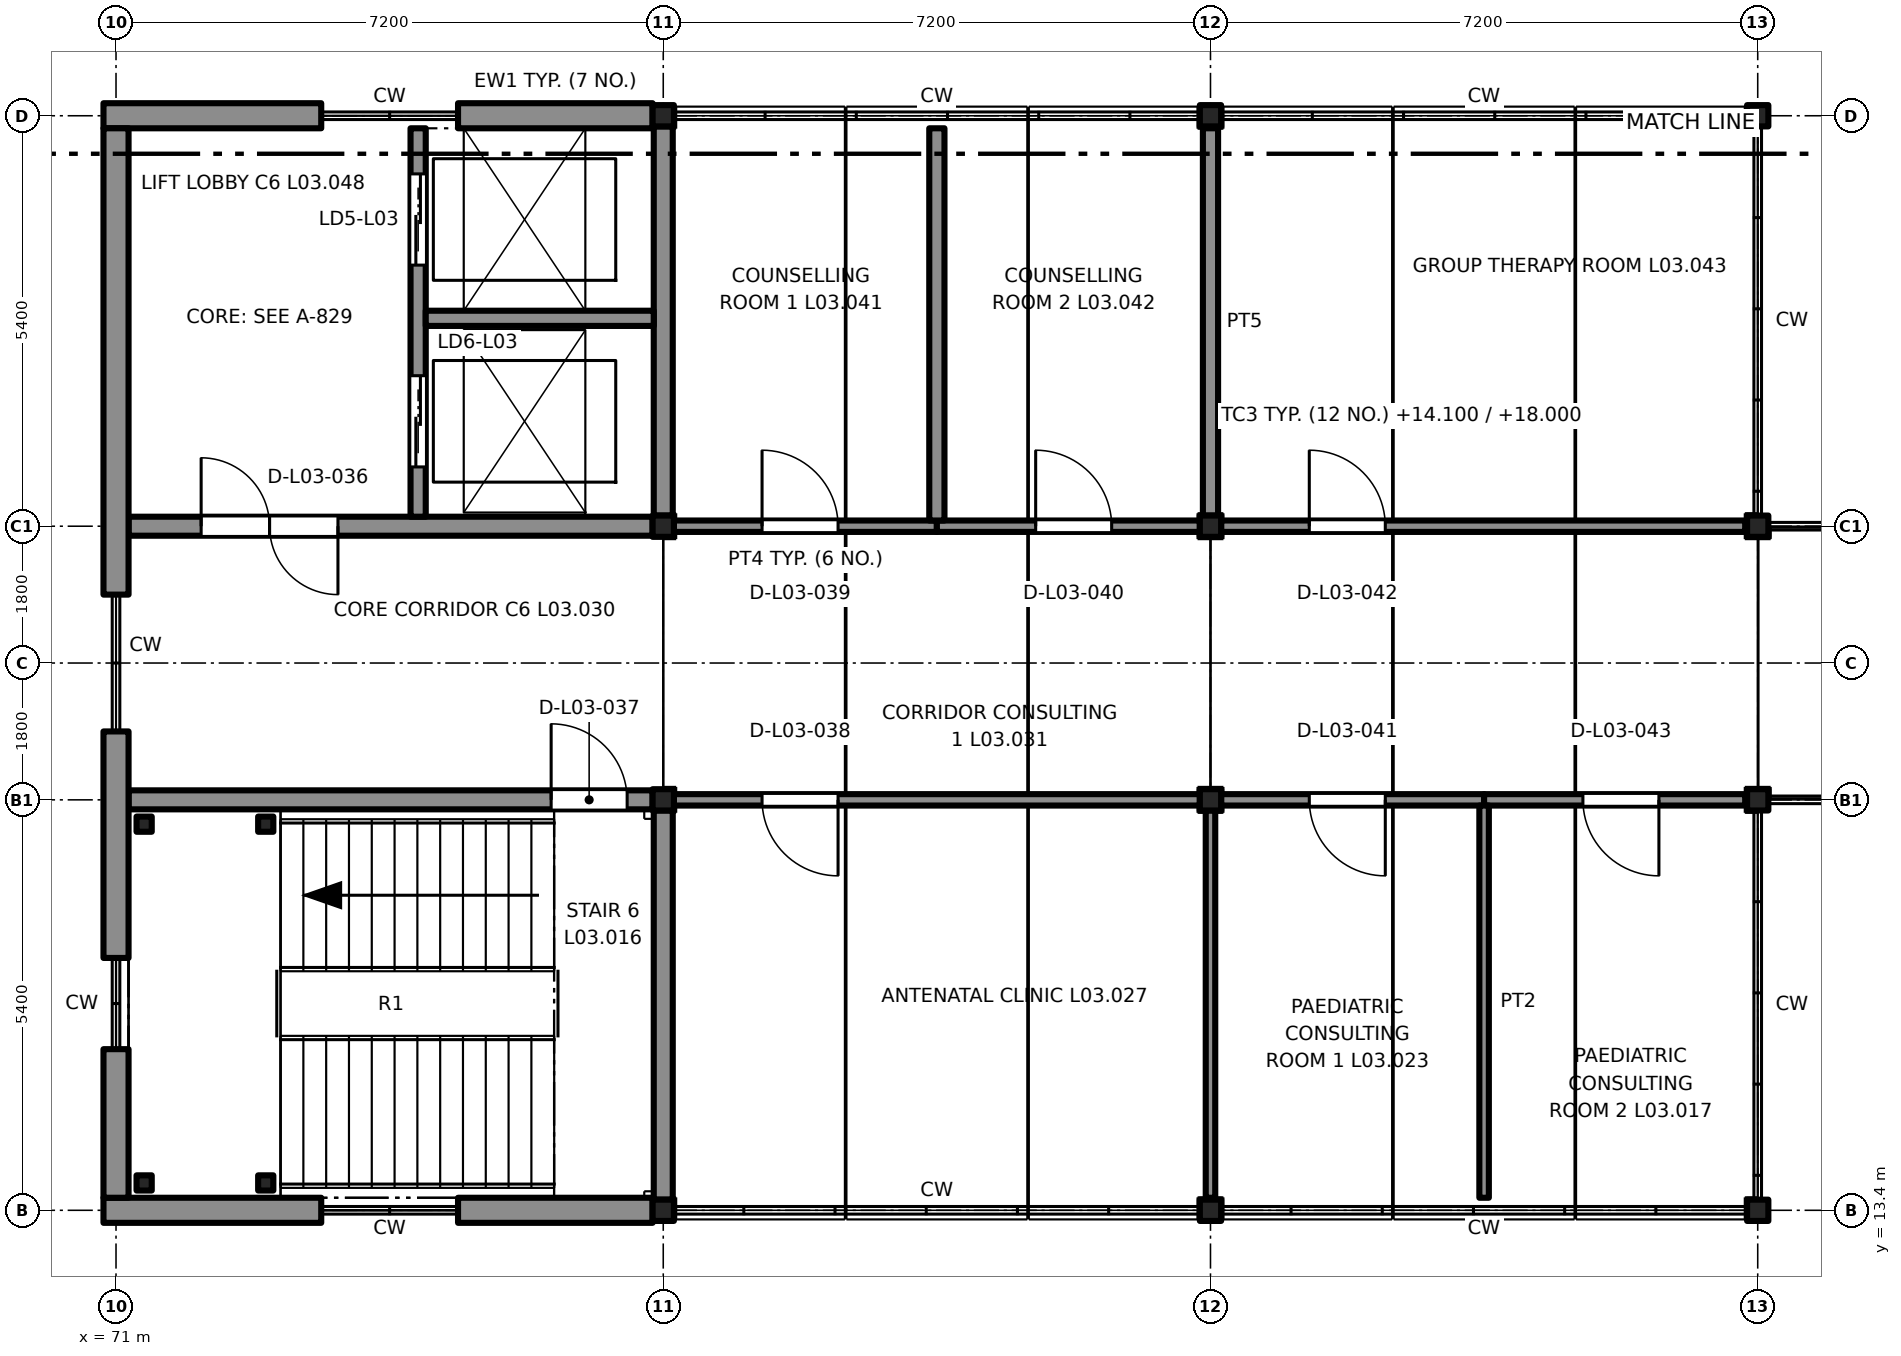
"""IFC4 building model, lengths in metres.
Left out: names, types, materials, properties, quantities, classifications, styles, units other than length and angle.
Written with IfcOpenShell. Run it as: python <this file> out.ifc"""

import sys

from ifc_helpers import new_model, si_unit, direction, frame, frame_2d, origin, origin_2d, place, context, subcontext, project, spatial, rectangle, extrude, element, fill, save


model = new_model("IFC4")
c1 = context("Model", 3, precision=1e-05, world=origin(), true_north=direction((0.0, 1.0)))
c2 = subcontext(c1, "Body", "Model", "MODEL_VIEW")
j1 = project(units=[si_unit("LENGTHUNIT", "METRE"), si_unit("PLANEANGLEUNIT", "RADIAN")], contexts=[c1])
p1 = place(None, origin())
s1 = spatial("IfcSite", under=j1, at=p1, CompositionType="ELEMENT")
p2 = place(p1, origin())
s2 = spatial("IfcBuilding", under=s1, at=p2, CompositionType="ELEMENT")
p3 = place(p2, frame((0.0, 0.0, 14.1)))
s3 = spatial("IfcBuildingStorey", under=s2, at=p3, CompositionType="ELEMENT", Elevation=14.1)
for number, where, z_axis, x_axis in (
    (1, (78.2, 13.4, 0.0), (0.0, 0.0, 1.0), (1.0, 0.0, 0.0)),
    (2, (78.2, 18.8, 0.0), (0.0, 0.0, 1.0), (1.0, 0.0, 0.0)),
    (3, (78.2, 22.4, 0.0), (0.0, 0.0, 1.0), (1.0, 0.0, 0.0)),
    (4, (78.2, 27.8, 0.0), (0.0, 0.0, 1.0), (1.0, 0.0, 0.0)),
    (5, (85.4, 13.4, 0.0), (0.0, 0.0, 1.0), (1.0, 0.0, 0.0)),
    (6, (85.4, 18.8, 0.0), (0.0, 0.0, 1.0), (1.0, 0.0, 0.0)),
    (7, (85.4, 22.4, 0.0), (0.0, 0.0, 1.0), (1.0, 0.0, 0.0)),
    (8, (85.4, 27.8, 0.0), (0.0, 0.0, 1.0), (1.0, 0.0, 0.0)),
    (9, (92.6, 13.4, 0.0), (0.0, 0.0, 1.0), (1.0, 0.0, 0.0)),
    (10, (92.6, 18.8, 0.0), (0.0, 0.0, 1.0), (1.0, 0.0, 0.0)),
    (11, (92.6, 22.4, 0.0), (0.0, 0.0, 1.0), (1.0, 0.0, 0.0)),
    (12, (92.6, 27.8, 0.0), (0.0, 0.0, 1.0), (1.0, 0.0, 0.0)),
):
    element("IfcColumn", number, at=place(p3, frame(where, z_axis=z_axis, x_axis=x_axis)), inside=s3, PredefinedType="COLUMN", context=c2, shape_type="SweptSolid", body=[
        extrude(rectangle(XDim=0.28, YDim=0.28, at=origin_2d()), origin(), (0.0, 0.0, 1.0), 3.9),
    ])
p4 = place(p3, frame((71.165, 18.8, 0.0), z_axis=(0.0, 0.0, 1.0), x_axis=(1.0, 0.0, 0.0)))
e13 = element("IfcWall", 13, at=p4, inside=s3, PredefinedType="SHEAR", context=c2, shape_type="SweptSolid", body=[
    extrude(rectangle(XDim=6.895, YDim=0.25, at=frame_2d((3.448, 0.0))), origin(), (0.0, 0.0, 1.0), 3.2),
])
p5 = place(p4, frame((5.56, 0.0, 0.0)))
e14 = element("IfcOpeningElement", 14, at=p5, cuts=e13, PredefinedType="OPENING", context=c2, shape_type="SweptSolid", body=[
    extrude(rectangle(XDim=1.0, YDim=2.1, at=frame_2d((0.5, 1.05))), frame((0.0, 0.135, 0.0), z_axis=(0.0, -1.0, 0.0), x_axis=(1.0, 0.0, 0.0)), (0.0, 0.0, 1.0), 0.27),
])
p6 = place(p3, frame((78.2, 13.54, 0.0), z_axis=(0.0, 0.0, 1.0), x_axis=(0.0, 1.0, 0.0)))
e15 = element("IfcWall", 15, at=p6, inside=s3, PredefinedType="SHEAR", context=c2, shape_type="SweptSolid", body=[
    extrude(rectangle(XDim=5.12, YDim=0.25, at=frame_2d((2.56, 0.0))), origin(), (0.0, 0.0, 1.0), 3.2),
])
p7 = place(p3, frame((71.165, 22.4, 0.0), z_axis=(0.0, 0.0, 1.0), x_axis=(1.0, 0.0, 0.0)))
e16 = element("IfcWall", 16, at=p7, inside=s3, PredefinedType="SHEAR", context=c2, shape_type="SweptSolid", body=[
    extrude(rectangle(XDim=6.895, YDim=0.25, at=frame_2d((3.448, 0.0))), origin(), (0.0, 0.0, 1.0), 3.2),
])
p8 = place(p7, frame((0.955, 0.0, 0.0)))
e17 = element("IfcOpeningElement", 17, at=p8, cuts=e16, PredefinedType="OPENING", context=c2, shape_type="SweptSolid", body=[
    extrude(rectangle(XDim=1.8, YDim=2.1, at=frame_2d((0.9, 1.05))), frame((0.0, 0.135, 0.0), z_axis=(0.0, -1.0, 0.0), x_axis=(1.0, 0.0, 0.0)), (0.0, 0.0, 1.0), 0.27),
])
p9 = place(p3, frame((78.2, 22.54, 0.0), z_axis=(0.0, 0.0, 1.0), x_axis=(0.0, 1.0, 0.0)))
e18 = element("IfcWall", 18, at=p9, inside=s3, PredefinedType="SHEAR", context=c2, shape_type="SweptSolid", body=[
    extrude(rectangle(XDim=5.12, YDim=0.25, at=frame_2d((2.56, 0.0))), origin(), (0.0, 0.0, 1.0), 3.2),
])
p10 = place(p3, frame((74.975, 22.525, 0.0), z_axis=(0.0, 0.0, 1.0), x_axis=(0.0, 1.0, 0.0)))
e19 = element("IfcWall", 19, at=p10, inside=s3, PredefinedType="SHEAR", context=c2, shape_type="SweptSolid", body=[
    extrude(rectangle(XDim=5.11, YDim=0.2, at=frame_2d((2.555, 0.0))), origin(), (0.0, 0.0, 1.0), 3.2),
])
p11 = place(p10, frame((3.31, 0.0, 0.0)))
e20 = element("IfcOpeningElement", 20, at=p11, cuts=e19, PredefinedType="OPENING", context=c2, shape_type="SweptSolid", body=[
    extrude(rectangle(XDim=1.2, YDim=2.1, at=frame_2d((0.6, 1.05))), frame((0.0, 0.11, 0.0), z_axis=(0.0, -1.0, 0.0), x_axis=(1.0, 0.0, 0.0)), (0.0, 0.0, 1.0), 0.22),
])
p12 = place(p10, frame((0.655, 0.0, 0.0)))
e21 = element("IfcOpeningElement", 21, at=p12, cuts=e19, PredefinedType="OPENING", context=c2, shape_type="SweptSolid", body=[
    extrude(rectangle(XDim=1.2, YDim=2.1, at=frame_2d((0.6, 1.05))), frame((0.0, 0.11, 0.0), z_axis=(0.0, -1.0, 0.0), x_axis=(1.0, 0.0, 0.0)), (0.0, 0.0, 1.0), 0.22),
])
p13 = place(p3, frame((78.075, 25.135, 0.0), z_axis=(0.0, 0.0, 1.0), x_axis=(-1.0, 0.0, 0.0)))
e22 = element("IfcWall", 22, at=p13, inside=s3, PredefinedType="SHEAR", context=c2, shape_type="SweptSolid", body=[
    extrude(rectangle(XDim=3.0, YDim=0.2, at=frame_2d((1.5, 0.0))), origin(), (0.0, 0.0, 1.0), 3.2),
])
for number, where, z_axis, x_axis in (
    (23, (71.37, 13.76, 0.0), (0.0, 0.0, 1.0), (1.0, 0.0, 0.0)),
    (24, (71.37, 18.48, 0.0), (0.0, 0.0, 1.0), (1.0, 0.0, 0.0)),
    (25, (72.97, 13.76, 0.0), (0.0, 0.0, 1.0), (1.0, 0.0, 0.0)),
    (26, (72.97, 18.48, 0.0), (0.0, 0.0, 1.0), (1.0, 0.0, 0.0)),
):
    element("IfcColumn", number, at=place(p3, frame(where, z_axis=z_axis, x_axis=x_axis)), inside=s3, PredefinedType="COLUMN", context=c2, shape_type="SweptSolid", body=[
        extrude(rectangle(XDim=0.2, YDim=0.2, at=origin_2d()), origin(), (0.0, 0.0, 1.0), 1.75),
    ])
p14 = place(p3, frame((73.7, 13.4, 0.0), z_axis=(0.0, 0.0, 1.0), x_axis=(-1.0, 0.0, 0.0)))
e27 = element("IfcWall", 27, at=p14, inside=s3, PredefinedType="SOLIDWALL", context=c2, shape_type="SweptSolid", body=[
    extrude(rectangle(XDim=2.865, YDim=0.33, at=frame_2d((1.433, 0.0))), origin(), (0.0, 0.0, 1.0), 3.2),
])
p15 = place(p3, frame((78.06, 13.4, 0.0), z_axis=(0.0, 0.0, 1.0), x_axis=(-1.0, 0.0, 0.0)))
e28 = element("IfcWall", 28, at=p15, inside=s3, PredefinedType="SOLIDWALL", context=c2, shape_type="SweptSolid", body=[
    extrude(rectangle(XDim=2.56, YDim=0.33, at=frame_2d((1.28, 0.0))), origin(), (0.0, 0.0, 1.0), 3.2),
])
p16 = place(p3, frame((70.835, 27.8, 0.0), z_axis=(0.0, 0.0, 1.0), x_axis=(1.0, 0.0, 0.0)))
e29 = element("IfcWall", 29, at=p16, inside=s3, PredefinedType="SOLIDWALL", context=c2, shape_type="SweptSolid", body=[
    extrude(rectangle(XDim=2.865, YDim=0.33, at=frame_2d((1.433, 0.0))), origin(), (0.0, 0.0, 1.0), 3.2),
])
p17 = place(p3, frame((75.5, 27.8, 0.0), z_axis=(0.0, 0.0, 1.0), x_axis=(1.0, 0.0, 0.0)))
e30 = element("IfcWall", 30, at=p17, inside=s3, PredefinedType="SOLIDWALL", context=c2, shape_type="SweptSolid", body=[
    extrude(rectangle(XDim=2.56, YDim=0.33, at=frame_2d((1.28, 0.0))), origin(), (0.0, 0.0, 1.0), 3.2),
])
p18 = place(p3, frame((71.0, 13.565, 0.0), z_axis=(0.0, 0.0, 1.0), x_axis=(0.0, 1.0, 0.0)))
e31 = element("IfcWall", 31, at=p18, inside=s3, PredefinedType="SOLIDWALL", context=c2, shape_type="SweptSolid", body=[
    extrude(rectangle(XDim=1.955, YDim=0.33, at=frame_2d((0.978, 0.0))), origin(), (0.0, 0.0, 1.0), 3.2),
])
p19 = place(p3, frame((71.0, 16.72, 0.0), z_axis=(0.0, 0.0, 1.0), x_axis=(0.0, 1.0, 0.0)))
e32 = element("IfcWall", 32, at=p19, inside=s3, PredefinedType="SOLIDWALL", context=c2, shape_type="SweptSolid", body=[
    extrude(rectangle(XDim=2.98, YDim=0.33, at=frame_2d((1.49, 0.0))), origin(), (0.0, 0.0, 1.0), 3.2),
])
p20 = place(p3, frame((71.0, 21.5, 0.0), z_axis=(0.0, 0.0, 1.0), x_axis=(0.0, 1.0, 0.0)))
e33 = element("IfcWall", 33, at=p20, inside=s3, PredefinedType="SOLIDWALL", context=c2, shape_type="SweptSolid", body=[
    extrude(rectangle(XDim=6.135, YDim=0.33, at=frame_2d((3.067, 0.0))), origin(), (0.0, 0.0, 1.0), 3.2),
])
p21 = place(p3, frame((85.26, 18.8, 0.0), z_axis=(0.0, 0.0, 1.0), x_axis=(-1.0, 0.0, 0.0)))
e34 = element("IfcWall", 34, at=p21, inside=s3, PredefinedType="PARTITIONING", context=c2, shape_type="SweptSolid", body=[
    extrude(rectangle(XDim=6.92, YDim=0.15, at=frame_2d((3.46, 0.0))), origin(), (0.0, 0.0, 1.0), 5.331),
])
p22 = place(p21, frame((4.76, 0.0, 0.0)))
e35 = element("IfcOpeningElement", 35, at=p22, cuts=e34, PredefinedType="OPENING", context=c2, shape_type="SweptSolid", body=[
    extrude(rectangle(XDim=1.0, YDim=2.1, at=frame_2d((0.5, 1.05))), frame((0.0, 0.085, 0.0), z_axis=(0.0, -1.0, 0.0), x_axis=(1.0, 0.0, 0.0)), (0.0, 0.0, 1.0), 0.17),
])
p23 = place(p3, frame((89.0, 18.8, 0.0), z_axis=(0.0, 0.0, 1.0), x_axis=(-1.0, 0.0, 0.0)))
e36 = element("IfcWall", 36, at=p23, inside=s3, PredefinedType="PARTITIONING", context=c2, shape_type="SweptSolid", body=[
    extrude(rectangle(XDim=3.46, YDim=0.15, at=frame_2d((1.73, 0.0))), origin(), (0.0, 0.0, 1.0), 5.331),
])
p24 = place(p23, frame((1.3, 0.0, 0.0)))
e37 = element("IfcOpeningElement", 37, at=p24, cuts=e36, PredefinedType="OPENING", context=c2, shape_type="SweptSolid", body=[
    extrude(rectangle(XDim=1.0, YDim=2.1, at=frame_2d((0.5, 1.05))), frame((0.0, 0.085, 0.0), z_axis=(0.0, -1.0, 0.0), x_axis=(1.0, 0.0, 0.0)), (0.0, 0.0, 1.0), 0.17),
])
p25 = place(p3, frame((85.4, 13.565, 0.0), z_axis=(0.0, 0.0, 1.0), x_axis=(0.0, 1.0, 0.0)))
e38 = element("IfcWall", 38, at=p25, inside=s3, PredefinedType="PARTITIONING", context=c2, shape_type="SweptSolid", body=[
    extrude(rectangle(XDim=5.095, YDim=0.125, at=frame_2d((2.547, 0.0))), origin(), (0.0, 0.0, 1.0), 3.9),
])
p26 = place(p3, frame((92.435, 18.8, 0.0), z_axis=(0.0, 0.0, 1.0), x_axis=(-1.0, 0.0, 0.0)))
e39 = element("IfcWall", 39, at=p26, inside=s3, PredefinedType="PARTITIONING", context=c2, shape_type="SweptSolid", body=[
    extrude(rectangle(XDim=3.435, YDim=0.15, at=frame_2d((1.718, 0.0))), origin(), (0.0, 0.0, 1.0), 5.331),
])
p27 = place(p26, frame((1.135, 0.0, 0.0)))
e40 = element("IfcOpeningElement", 40, at=p27, cuts=e39, PredefinedType="OPENING", context=c2, shape_type="SweptSolid", body=[
    extrude(rectangle(XDim=1.0, YDim=2.1, at=frame_2d((0.5, 1.05))), frame((0.0, 0.085, 0.0), z_axis=(0.0, -1.0, 0.0), x_axis=(1.0, 0.0, 0.0)), (0.0, 0.0, 1.0), 0.17),
])
p28 = place(p3, frame((89.0, 13.565, 0.0), z_axis=(0.0, 0.0, 1.0), x_axis=(0.0, 1.0, 0.0)))
e41 = element("IfcWall", 41, at=p28, inside=s3, PredefinedType="PARTITIONING", context=c2, shape_type="SweptSolid", body=[
    extrude(rectangle(XDim=5.16, YDim=0.125, at=frame_2d((2.58, 0.0))), origin(), (0.0, 0.0, 1.0), 5.331),
])
p29 = place(p3, frame((78.34, 22.4, 0.0), z_axis=(0.0, 0.0, 1.0), x_axis=(1.0, 0.0, 0.0)))
e42 = element("IfcWall", 42, at=p29, inside=s3, PredefinedType="PARTITIONING", context=c2, shape_type="SweptSolid", body=[
    extrude(rectangle(XDim=3.46, YDim=0.15, at=frame_2d((1.73, 0.0))), origin(), (0.0, 0.0, 1.0), 5.331),
])
p30 = place(p29, frame((1.16, 0.0, 0.0)))
e43 = element("IfcOpeningElement", 43, at=p30, cuts=e42, PredefinedType="OPENING", context=c2, shape_type="SweptSolid", body=[
    extrude(rectangle(XDim=1.0, YDim=2.1, at=frame_2d((0.5, 1.05))), frame((0.0, 0.085, 0.0), z_axis=(0.0, -1.0, 0.0), x_axis=(1.0, 0.0, 0.0)), (0.0, 0.0, 1.0), 0.17),
])
p31 = place(p3, frame((81.8, 22.4, 0.0), z_axis=(0.0, 0.0, 1.0), x_axis=(1.0, 0.0, 0.0)))
e44 = element("IfcWall", 44, at=p31, inside=s3, PredefinedType="PARTITIONING", context=c2, shape_type="SweptSolid", body=[
    extrude(rectangle(XDim=3.46, YDim=0.15, at=frame_2d((1.73, 0.0))), origin(), (0.0, 0.0, 1.0), 5.331),
])
p32 = place(p31, frame((1.3, 0.0, 0.0)))
e45 = element("IfcOpeningElement", 45, at=p32, cuts=e44, PredefinedType="OPENING", context=c2, shape_type="SweptSolid", body=[
    extrude(rectangle(XDim=1.0, YDim=2.1, at=frame_2d((0.5, 1.05))), frame((0.0, 0.085, 0.0), z_axis=(0.0, -1.0, 0.0), x_axis=(1.0, 0.0, 0.0)), (0.0, 0.0, 1.0), 0.17),
])
p33 = place(p3, frame((81.8, 27.635, 0.0), z_axis=(0.0, 0.0, 1.0), x_axis=(0.0, -1.0, 0.0)))
e46 = element("IfcWall", 46, at=p33, inside=s3, PredefinedType="PARTITIONING", context=c2, shape_type="SweptSolid", body=[
    extrude(rectangle(XDim=5.16, YDim=0.2, at=frame_2d((2.58, 0.0))), origin(), (0.0, 0.0, 1.0), 5.331),
])
p34 = place(p3, frame((85.54, 22.4, 0.0), z_axis=(0.0, 0.0, 1.0), x_axis=(1.0, 0.0, 0.0)))
e47 = element("IfcWall", 47, at=p34, inside=s3, PredefinedType="PARTITIONING", context=c2, shape_type="SweptSolid", body=[
    extrude(rectangle(XDim=6.895, YDim=0.15, at=frame_2d((3.448, 0.0))), origin(), (0.0, 0.0, 1.0), 5.331),
])
p35 = place(p34, frame((1.16, 0.0, 0.0)))
e48 = element("IfcOpeningElement", 48, at=p35, cuts=e47, PredefinedType="OPENING", context=c2, shape_type="SweptSolid", body=[
    extrude(rectangle(XDim=1.0, YDim=2.1, at=frame_2d((0.5, 1.05))), frame((0.0, 0.085, 0.0), z_axis=(0.0, -1.0, 0.0), x_axis=(1.0, 0.0, 0.0)), (0.0, 0.0, 1.0), 0.17),
])
p36 = place(p3, frame((85.4, 27.635, 0.0), z_axis=(0.0, 0.0, 1.0), x_axis=(0.0, -1.0, 0.0)))
e49 = element("IfcWall", 49, at=p36, inside=s3, PredefinedType="PARTITIONING", context=c2, shape_type="SweptSolid", body=[
    extrude(rectangle(XDim=5.095, YDim=0.2, at=frame_2d((2.547, 0.0))), origin(), (0.0, 0.0, 1.0), 3.9),
])
p37 = place(p5, origin())
e50 = element("IfcDoor", 50, at=p37, inside=s3, OperationType="SINGLE_SWING_RIGHT", PredefinedType="DOOR", context=c2, shape_type="SweptSolid", body=[
    extrude(rectangle(XDim=1.0, YDim=2.1, at=frame_2d((0.5, 1.05))), frame((0.0, 0.025, 0.0), z_axis=(0.0, -1.0, 0.0), x_axis=(1.0, 0.0, 0.0)), (0.0, 0.0, 1.0), 0.05),
])
fill(e14, e50)
p38 = place(p8, origin())
e51 = element("IfcDoor", 51, at=p38, inside=s3, OperationType="DOUBLE_DOOR_SINGLE_SWING", PredefinedType="DOOR", context=c2, shape_type="SweptSolid", body=[
    extrude(rectangle(XDim=1.8, YDim=2.1, at=frame_2d((0.9, 1.05))), frame((0.0, 0.025, 0.0), z_axis=(0.0, -1.0, 0.0), x_axis=(1.0, 0.0, 0.0)), (0.0, 0.0, 1.0), 0.05),
])
fill(e17, e51)
p39 = place(p11, origin())
e52 = element("IfcDoor", 52, at=p39, inside=s3, OperationType="DOUBLE_DOOR_SLIDING", PredefinedType="DOOR", context=c2, shape_type="SweptSolid", body=[
    extrude(rectangle(XDim=1.2, YDim=2.1, at=frame_2d((0.6, 1.05))), frame((0.0, 0.025, 0.0), z_axis=(0.0, -1.0, 0.0), x_axis=(1.0, 0.0, 0.0)), (0.0, 0.0, 1.0), 0.05),
])
fill(e20, e52)
p40 = place(p12, origin())
e53 = element("IfcDoor", 53, at=p40, inside=s3, OperationType="DOUBLE_DOOR_SLIDING", PredefinedType="DOOR", context=c2, shape_type="SweptSolid", body=[
    extrude(rectangle(XDim=1.2, YDim=2.1, at=frame_2d((0.6, 1.05))), frame((0.0, 0.025, 0.0), z_axis=(0.0, -1.0, 0.0), x_axis=(1.0, 0.0, 0.0)), (0.0, 0.0, 1.0), 0.05),
])
fill(e21, e53)
p41 = place(p22, origin())
e54 = element("IfcDoor", 54, at=p41, inside=s3, OperationType="SINGLE_SWING_RIGHT", PredefinedType="DOOR", context=c2, shape_type="SweptSolid", body=[
    extrude(rectangle(XDim=1.0, YDim=2.1, at=frame_2d((0.5, 1.05))), frame((0.0, 0.025, 0.0), z_axis=(0.0, -1.0, 0.0), x_axis=(1.0, 0.0, 0.0)), (0.0, 0.0, 1.0), 0.05),
])
fill(e35, e54)
p42 = place(p24, origin())
e55 = element("IfcDoor", 55, at=p42, inside=s3, OperationType="SINGLE_SWING_RIGHT", PredefinedType="DOOR", context=c2, shape_type="SweptSolid", body=[
    extrude(rectangle(XDim=1.0, YDim=2.1, at=frame_2d((0.5, 1.05))), frame((0.0, 0.025, 0.0), z_axis=(0.0, -1.0, 0.0), x_axis=(1.0, 0.0, 0.0)), (0.0, 0.0, 1.0), 0.05),
])
fill(e37, e55)
p43 = place(p27, origin())
e56 = element("IfcDoor", 56, at=p43, inside=s3, OperationType="SINGLE_SWING_LEFT", PredefinedType="DOOR", context=c2, shape_type="SweptSolid", body=[
    extrude(rectangle(XDim=1.0, YDim=2.1, at=frame_2d((0.5, 1.05))), frame((0.0, 0.025, 0.0), z_axis=(0.0, -1.0, 0.0), x_axis=(1.0, 0.0, 0.0)), (0.0, 0.0, 1.0), 0.05),
])
fill(e40, e56)
p44 = place(p30, origin())
e57 = element("IfcDoor", 57, at=p44, inside=s3, OperationType="SINGLE_SWING_LEFT", PredefinedType="DOOR", context=c2, shape_type="SweptSolid", body=[
    extrude(rectangle(XDim=1.0, YDim=2.1, at=frame_2d((0.5, 1.05))), frame((0.0, 0.025, 0.0), z_axis=(0.0, -1.0, 0.0), x_axis=(1.0, 0.0, 0.0)), (0.0, 0.0, 1.0), 0.05),
])
fill(e43, e57)
p45 = place(p32, origin())
e58 = element("IfcDoor", 58, at=p45, inside=s3, OperationType="SINGLE_SWING_RIGHT", PredefinedType="DOOR", context=c2, shape_type="SweptSolid", body=[
    extrude(rectangle(XDim=1.0, YDim=2.1, at=frame_2d((0.5, 1.05))), frame((0.0, 0.025, 0.0), z_axis=(0.0, -1.0, 0.0), x_axis=(1.0, 0.0, 0.0)), (0.0, 0.0, 1.0), 0.05),
])
fill(e45, e58)
p46 = place(p35, origin())
e59 = element("IfcDoor", 59, at=p46, inside=s3, OperationType="SINGLE_SWING_LEFT", PredefinedType="DOOR", context=c2, shape_type="SweptSolid", body=[
    extrude(rectangle(XDim=1.0, YDim=2.1, at=frame_2d((0.5, 1.05))), frame((0.0, 0.025, 0.0), z_axis=(0.0, -1.0, 0.0), x_axis=(1.0, 0.0, 0.0)), (0.0, 0.0, 1.0), 0.05),
])
fill(e48, e59)
save(model, sys.argv[1])
